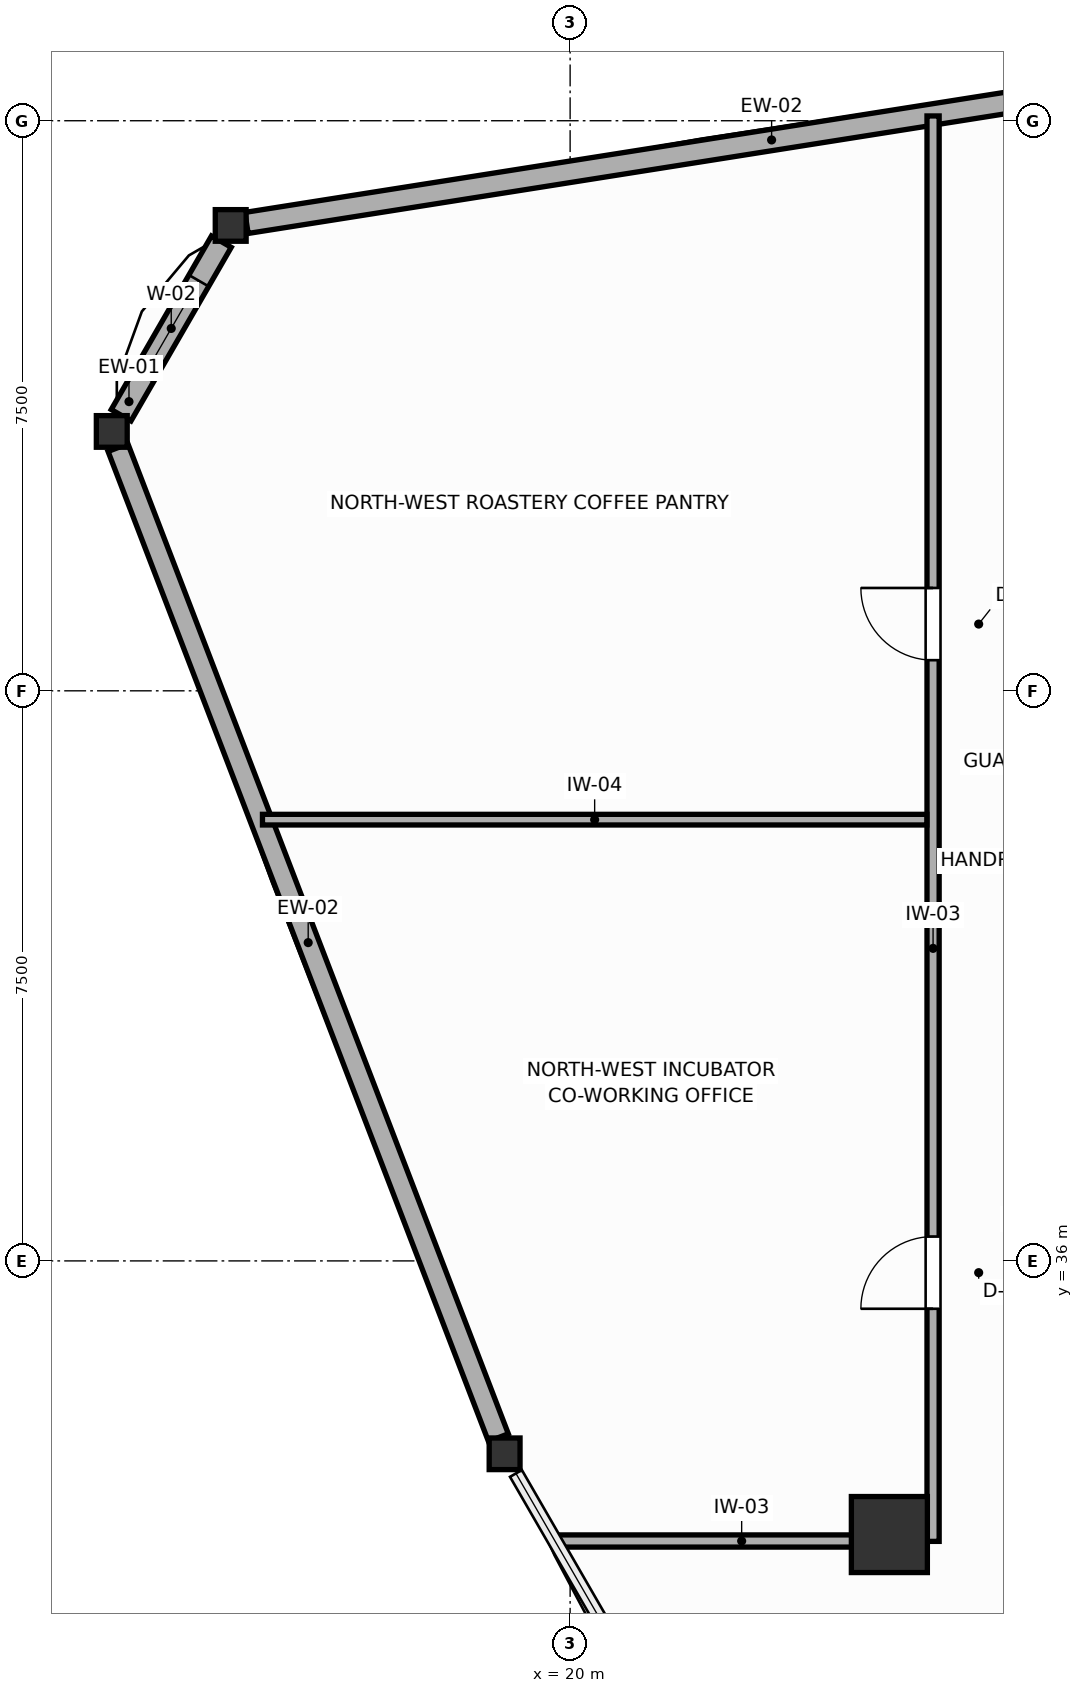
"""IFC4 building model, lengths in metres.
Left out: names, types, materials, properties, quantities, classifications, styles, units other than length and angle.
Written with IfcOpenShell. Run it as: python <this file> out.ifc"""

import sys

from ifc_helpers import new_model, si_unit, direction, frame, frame_2d, origin, origin_2d, place, context, subcontext, project, spatial, rectangle, i_section, extrude, source, transform, mapped, element, fill, save


model = new_model("IFC4")
c1 = context("Model", 3, precision=1e-05, world=origin(), true_north=direction((0.0, 1.0)))
c2 = subcontext(c1, "Body", "Model", "MODEL_VIEW")
j1 = project(units=[si_unit("LENGTHUNIT", "METRE"), si_unit("PLANEANGLEUNIT", "RADIAN")], contexts=[c1])
p1 = place(None, origin())
s1 = spatial("IfcSite", under=j1, at=p1, CompositionType="ELEMENT")
p2 = place(p1, origin())
s2 = spatial("IfcBuilding", under=s1, at=p2, CompositionType="ELEMENT")
p3 = place(p2, frame((0.0, 0.0, 197.4)))
s3 = spatial("IfcBuildingStorey", under=s2, at=p3, CompositionType="ELEMENT", Elevation=197.4)
m1 = source(origin(), c2, "Body", "SweptSolid", [
    extrude(rectangle(XDim=1.0, YDim=1.0, at=origin_2d()), origin(), (0.0, 0.0, 1.0), 3.6),
])
p4 = place(p3, frame((24.2, 32.4, 0.0), z_axis=(0.0, 0.0, 1.0), x_axis=(1.0, 0.0, 0.0)))
e1 = element("IfcColumn", 1, at=p4, inside=s3, PredefinedType="COLUMN", context=c2, shape_type="MappedRepresentation", body=[
    mapped(m1, transform((0.0, 0.0, 0.0), scale=1.0)),
])
m2 = source(origin(), c2, "Body", "SweptSolid", [
    extrude(i_section(OverallWidth=0.406, OverallDepth=0.416, WebThickness=0.027, FlangeThickness=0.044, FilletRadius=0.015, at=origin_2d()), origin(), (0.0, 0.0, 1.0), 3.6),
])
for number, where, z_axis, x_axis in (
    (2, (15.534, 49.623, 0.0), (0.0, 0.0, 1.0), (1.0, 0.0, 0.0)),
    (3, (13.97, 46.912, 0.0), (0.0, 0.0, 1.0), (1.0, 0.0, 0.0)),
    (4, (19.138, 33.462, 0.0), (0.0, 0.0, 1.0), (1.0, 0.0, 0.0)),
):
    element("IfcColumn", number, at=place(p3, frame(where, z_axis=z_axis, x_axis=x_axis)), inside=s3, PredefinedType="COLUMN", context=c2, shape_type="MappedRepresentation", body=[
        mapped(m2, transform((0.0, 0.0, 0.0), scale=1.0)),
    ])
p5 = place(p3, frame((29.559, 51.839, 0.0), z_axis=(0.0, 0.0, 1.0), x_axis=(-0.987743003355, -0.15608894683, 0.0)))
e5 = element("IfcWall", 5, at=p5, inside=s3, PredefinedType="SOLIDWALL", context=c2, shape_type="SweptSolid", body=[
    extrude(rectangle(XDim=13.988, YDim=0.28, at=frame_2d((6.994, 0.0))), origin(), (0.0, 0.0, 1.0), 2.81),
])
p6 = place(p3, frame((15.412, 49.409, 0.0), z_axis=(0.0, 0.0, 1.0), x_axis=(-0.500061666259, -0.865989797826, 0.0)))
e6 = element("IfcWall", 6, at=p6, inside=s3, PredefinedType="SOLIDWALL", context=c2, shape_type="SweptSolid", body=[
    extrude(rectangle(XDim=2.637, YDim=0.3, at=frame_2d((1.319, 0.0))), origin(), (0.0, 0.0, 1.0), 2.87),
])
p7 = place(p6, frame((0.594, 0.0, 0.75)))
e7 = element("IfcOpeningElement", 7, at=p7, cuts=e6, PredefinedType="OPENING", context=c2, shape_type="SweptSolid", body=[
    extrude(rectangle(XDim=1.45, YDim=1.65, at=frame_2d((0.725, 0.825))), frame((0.0, 0.16, 0.0), z_axis=(0.0, -1.0, 0.0), x_axis=(1.0, 0.0, 0.0)), (0.0, 0.0, 1.0), 0.32),
])
p8 = place(p3, frame((14.052, 46.699, 0.0), z_axis=(0.0, 0.0, 1.0), x_axis=(0.358703519473, -0.933451544065, 0.0)))
e8 = element("IfcWall", 8, at=p8, inside=s3, PredefinedType="SOLIDWALL", context=c2, shape_type="SweptSolid", body=[
    extrude(rectangle(XDim=13.953, YDim=0.28, at=frame_2d((6.976, 0.0))), origin(), (0.0, 0.0, 1.0), 2.81),
])
p9 = place(p3, frame((24.775, 32.31, 0.0), z_axis=(0.0, 0.0, 1.0), x_axis=(0.0, 1.0, 0.0)))
e9 = element("IfcWall", 9, at=p9, inside=s3, PredefinedType="PARTITIONING", context=c2, shape_type="SweptSolid", body=[
    extrude(rectangle(XDim=18.753, YDim=0.16, at=frame_2d((9.376, 0.0))), origin(), (0.0, 0.0, 1.0), 3.26),
])
p10 = place(p9, frame((3.06, 0.0, 0.0)))
e10 = element("IfcOpeningElement", 10, at=p10, cuts=e9, PredefinedType="OPENING", context=c2, shape_type="SweptSolid", body=[
    extrude(rectangle(XDim=0.95, YDim=2.05, at=frame_2d((0.475, 1.025))), frame((0.0, 0.09, 0.0), z_axis=(0.0, -1.0, 0.0), x_axis=(1.0, 0.0, 0.0)), (0.0, 0.0, 1.0), 0.18),
])
p11 = place(p9, frame((11.593, 0.0, 0.0)))
e11 = element("IfcOpeningElement", 11, at=p11, cuts=e9, PredefinedType="OPENING", context=c2, shape_type="SweptSolid", body=[
    extrude(rectangle(XDim=0.95, YDim=2.05, at=frame_2d((0.475, 1.025))), frame((0.0, 0.09, 0.0), z_axis=(0.0, -1.0, 0.0), x_axis=(1.0, 0.0, 0.0)), (0.0, 0.0, 1.0), 0.18),
])
p12 = place(p3, frame((19.82, 32.315, 0.0), z_axis=(0.0, 0.0, 1.0), x_axis=(1.0, 0.0, 0.0)))
e12 = element("IfcWall", 12, at=p12, inside=s3, PredefinedType="PARTITIONING", context=c2, shape_type="SweptSolid", body=[
    extrude(rectangle(XDim=4.873, YDim=0.16, at=frame_2d((2.437, 0.0))), origin(), (0.0, 0.0, 1.0), 2.81),
])
p13 = place(p3, frame((15.952, 41.805, 0.0), z_axis=(0.0, 0.0, 1.0), x_axis=(1.0, 0.0, 0.0)))
e13 = element("IfcWall", 13, at=p13, inside=s3, PredefinedType="PARTITIONING", context=c2, shape_type="SweptSolid", body=[
    extrude(rectangle(XDim=8.741, YDim=0.14, at=frame_2d((4.37, 0.0))), origin(), (0.0, 0.0, 1.0), 3.26),
])
p14 = place(p7, origin())
e14 = element("IfcWindow", 14, at=p14, inside=s3, PartitioningType="SINGLE_PANEL", PredefinedType="WINDOW", context=c2, shape_type="SweptSolid", body=[
    extrude(rectangle(XDim=1.45, YDim=1.65, at=frame_2d((0.725, 0.825))), frame((0.0, 0.03, 0.0), z_axis=(0.0, -1.0, 0.0), x_axis=(1.0, 0.0, 0.0)), (0.0, 0.0, 1.0), 0.06),
])
fill(e7, e14)
p15 = place(p10, origin())
e15 = element("IfcDoor", 15, at=p15, inside=s3, OperationType="SINGLE_SWING_LEFT", PredefinedType="DOOR", context=c2, shape_type="SweptSolid", body=[
    extrude(rectangle(XDim=0.95, YDim=2.05, at=frame_2d((0.475, 1.025))), frame((0.0, 0.025, 0.0), z_axis=(0.0, -1.0, 0.0), x_axis=(1.0, 0.0, 0.0)), (0.0, 0.0, 1.0), 0.05),
])
fill(e10, e15)
p16 = place(p11, origin())
e16 = element("IfcDoor", 16, at=p16, inside=s3, OperationType="SINGLE_SWING_RIGHT", PredefinedType="DOOR", context=c2, shape_type="SweptSolid", body=[
    extrude(rectangle(XDim=0.95, YDim=2.05, at=frame_2d((0.475, 1.025))), frame((0.0, 0.025, 0.0), z_axis=(0.0, -1.0, 0.0), x_axis=(1.0, 0.0, 0.0)), (0.0, 0.0, 1.0), 0.05),
])
fill(e11, e16)
save(model, sys.argv[1])
